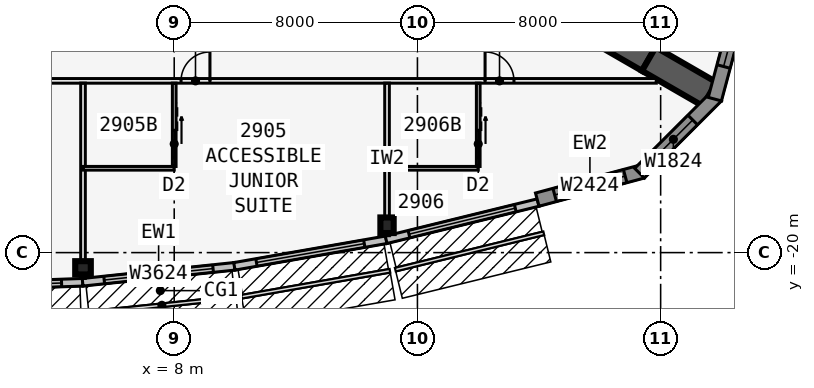
"""IFC4 building model, lengths in metres.
Left out: names, types, materials, properties, quantities, classifications, styles, units other than length and angle.
Written with IfcOpenShell. Run it as: python <this file> out.ifc"""

import sys

from ifc_helpers import new_model, si_unit, direction, frame, frame_2d, origin, origin_2d, place, context, subcontext, project, spatial, polyline, rectangle, i_section, outline, extrude, element, fill, save


model = new_model("IFC4")
c1 = context("Model", 3, precision=1e-05, world=origin(), true_north=direction((0.0, 1.0)))
c2 = subcontext(c1, "Body", "Model", "MODEL_VIEW")
j1 = project(units=[si_unit("LENGTHUNIT", "METRE"), si_unit("PLANEANGLEUNIT", "RADIAN")], contexts=[c1])
p1 = place(None, origin())
s1 = spatial("IfcSite", under=j1, at=p1, CompositionType="ELEMENT")
p2 = place(p1, origin())
s2 = spatial("IfcBuilding", under=s1, at=p2, CompositionType="ELEMENT")
p3 = place(p2, frame((0.0, 0.0, 114.7)))
s3 = spatial("IfcBuildingStorey", under=s2, at=p3, CompositionType="ELEMENT", Elevation=114.7)
for number, where, z_axis, x_axis in (
    (1, (21.61, -12.477, 0.0), (0.0, 0.0, 1.0), (0.866, -0.5, 0.0)),
    (2, (23.61, -13.631, 0.0), (0.0, 0.0, 1.0), (0.866, -0.5, 0.0)),
):
    element("IfcWall", number, at=place(p3, frame(where, z_axis=z_axis, x_axis=x_axis)), inside=s3, PredefinedType="SHEAR", context=c2, shape_type="SweptSolid", body=[
        extrude(rectangle(XDim=2.309, YDim=0.9, at=frame_2d((1.155, 0.0))), origin(), (0.0, 0.0, 1.0), 3.4),
    ])
for number, where, z_axis, x_axis in (
    (3, (5.0, -20.5, 0.0), (0.0, 0.0, 1.0), (0.0, -1.0, 0.0)),
    (4, (15.0, -19.1, 0.0), (0.0, 0.0, 1.0), (1.0, 0.0, 0.0)),
):
    element("IfcColumn", number, at=place(p3, frame(where, z_axis=z_axis, x_axis=x_axis)), inside=s3, PredefinedType="COLUMN", context=c2, shape_type="SweptSolid", body=[
        extrude(i_section(OverallWidth=0.437, OverallDepth=0.513, WebThickness=0.061, FlangeThickness=0.097, at=origin_2d()), origin(), (0.0, 0.0, 1.0), 3.4),
    ])
p4 = place(p3, frame((-0.004, -21.15, 0.0), z_axis=(0.0, 0.0, 1.0), x_axis=(0.999387720943, 0.034988329879, 0.0)))
e5 = element("IfcWall", 5, at=p4, inside=s3, PredefinedType="STANDARD", context=c2, shape_type="SweptSolid", body=[
    extrude(rectangle(XDim=5.003, YDim=0.25, at=frame_2d((2.501, 0.0))), origin(), (0.0, 0.0, 1.0), 3.235),
])
p5 = place(p4, frame((0.701, 0.0, 0.45)))
e6 = element("IfcOpeningElement", 6, at=p5, cuts=e5, PredefinedType="OPENING", context=c2, shape_type="SweptSolid", body=[
    extrude(rectangle(XDim=3.6, YDim=2.4, at=frame_2d((1.8, 1.2))), frame((0.0, 0.135, 0.0), z_axis=(0.0, -1.0, 0.0), x_axis=(1.0, 0.0, 0.0)), (0.0, 0.0, 1.0), 0.27),
])
p6 = place(p3, frame((4.987, -20.976, 0.0), z_axis=(0.0, 0.0, 1.0), x_axis=(0.994534683851, 0.104406717299, 0.0)))
e7 = element("IfcWall", 7, at=p6, inside=s3, PredefinedType="STANDARD", context=c2, shape_type="SweptSolid", body=[
    extrude(rectangle(XDim=5.028, YDim=0.25, at=frame_2d((2.514, 0.0))), origin(), (0.0, 0.0, 1.0), 3.235),
])
p7 = place(p6, frame((0.714, 0.0, 0.45)))
e8 = element("IfcOpeningElement", 8, at=p7, cuts=e7, PredefinedType="OPENING", context=c2, shape_type="SweptSolid", body=[
    extrude(rectangle(XDim=3.6, YDim=2.4, at=frame_2d((1.8, 1.2))), frame((0.0, 0.135, 0.0), z_axis=(0.0, -1.0, 0.0), x_axis=(1.0, 0.0, 0.0)), (0.0, 0.0, 1.0), 0.27),
])
p8 = place(p3, frame((9.979, -20.452, 0.0), z_axis=(0.0, 0.0, 1.0), x_axis=(0.985030467156, 0.172380331752, 0.0)))
e9 = element("IfcWall", 9, at=p8, inside=s3, PredefinedType="STANDARD", context=c2, shape_type="SweptSolid", body=[
    extrude(rectangle(XDim=5.076, YDim=0.25, at=frame_2d((2.538, 0.0))), origin(), (0.0, 0.0, 1.0), 3.235),
])
p9 = place(p8, frame((0.738, 0.0, 0.45)))
e10 = element("IfcOpeningElement", 10, at=p9, cuts=e9, PredefinedType="OPENING", context=c2, shape_type="SweptSolid", body=[
    extrude(rectangle(XDim=3.6, YDim=2.4, at=frame_2d((1.8, 1.2))), frame((0.0, 0.135, 0.0), z_axis=(0.0, -1.0, 0.0), x_axis=(1.0, 0.0, 0.0)), (0.0, 0.0, 1.0), 0.27),
])
p10 = place(p3, frame((14.97, -19.579, 0.0), z_axis=(0.0, 0.0, 1.0), x_axis=(0.971270024053, 0.237980126011, 0.0)))
e11 = element("IfcWall", 11, at=p10, inside=s3, PredefinedType="STANDARD", context=c2, shape_type="SweptSolid", body=[
    extrude(rectangle(XDim=5.148, YDim=0.25, at=frame_2d((2.574, 0.0))), origin(), (0.0, 0.0, 1.0), 3.235),
])
p11 = place(p10, frame((0.774, 0.0, 0.45)))
e12 = element("IfcOpeningElement", 12, at=p11, cuts=e11, PredefinedType="OPENING", context=c2, shape_type="SweptSolid", body=[
    extrude(rectangle(XDim=3.6, YDim=2.4, at=frame_2d((1.8, 1.2))), frame((0.0, 0.135, 0.0), z_axis=(0.0, -1.0, 0.0), x_axis=(1.0, 0.0, 0.0)), (0.0, 0.0, 1.0), 0.27),
])
p12 = place(p3, frame((19.942, -18.258, 0.0), z_axis=(0.0, 0.0, 1.0), x_axis=(0.965924653531, 0.258823421857, 0.0)))
e13 = element("IfcWall", 13, at=p12, inside=s3, PredefinedType="SOLIDWALL", context=c2, shape_type="SweptSolid", body=[
    extrude(rectangle(XDim=3.586, YDim=0.45, at=frame_2d((1.793, 0.0))), origin(), (0.0, 0.0, 1.0), 3.235),
])
p13 = place(p12, frame((0.593, 0.0, 0.45)))
e14 = element("IfcOpeningElement", 14, at=p13, cuts=e13, PredefinedType="OPENING", context=c2, shape_type="SweptSolid", body=[
    extrude(rectangle(XDim=2.4, YDim=2.4, at=frame_2d((1.2, 1.2))), frame((0.0, 0.235, 0.0), z_axis=(0.0, -1.0, 0.0), x_axis=(1.0, 0.0, 0.0)), (0.0, 0.0, 1.0), 0.47),
])
p14 = place(p3, frame((23.305, -17.388, 0.0), z_axis=(0.0, 0.0, 1.0), x_axis=(0.707106781187, 0.707106781187, 0.0)))
e15 = element("IfcWall", 15, at=p14, inside=s3, PredefinedType="SOLIDWALL", context=c2, shape_type="SweptSolid", body=[
    extrude(outline(polyline([(3.586, 0.225), (3.527, 0.225), (3.035, 0.093), (3.0, 0.225), (0.0, 0.225), (0.0, -0.225), (3.586, -0.225), (3.586, 0.225)])), origin(), (0.0, 0.0, 1.0), 3.235),
])
p15 = place(p14, frame((0.675, 0.0, 0.45)))
e16 = element("IfcOpeningElement", 16, at=p15, cuts=e15, PredefinedType="OPENING", context=c2, shape_type="SweptSolid", body=[
    extrude(rectangle(XDim=1.8, YDim=2.4, at=frame_2d((0.9, 1.2))), frame((0.0, 0.235, 0.0), z_axis=(0.0, -1.0, 0.0), x_axis=(1.0, 0.0, 0.0)), (0.0, 0.0, 1.0), 0.47),
])
p16 = place(p3, frame((25.783, -14.953, 0.0), z_axis=(0.0, 0.0, 1.0), x_axis=(0.258823421857, 0.965924653531, 0.0)))
e17 = element("IfcWall", 17, at=p16, inside=s3, PredefinedType="SOLIDWALL", context=c2, shape_type="SweptSolid", body=[
    extrude(outline(polyline([(3.586, 0.225), (0.586, 0.225), (0.551, 0.093), (0.06, 0.225), (0.0, 0.225), (0.0, -0.225), (3.586, -0.225), (3.586, 0.225)])), origin(), (0.0, 0.0, 1.0), 3.235),
])
p17 = place(p16, frame((1.111, 0.0, 0.45)))
e18 = element("IfcOpeningElement", 18, at=p17, cuts=e17, PredefinedType="OPENING", context=c2, shape_type="SweptSolid", body=[
    extrude(rectangle(XDim=1.8, YDim=2.4, at=frame_2d((0.9, 1.2))), frame((0.0, 0.235, 0.0), z_axis=(0.0, -1.0, 0.0), x_axis=(1.0, 0.0, 0.0)), (0.0, 0.0, 1.0), 0.47),
])
p18 = place(p3, frame((-23.857, -14.351, 0.0), z_axis=(0.0, 0.0, 1.0), x_axis=(1.0, 0.0, 0.0)))
e19 = element("IfcWall", 19, at=p18, inside=s3, PredefinedType="PARTITIONING", context=c2, shape_type="SweptSolid", body=[
    extrude(rectangle(XDim=47.714, YDim=0.15, at=frame_2d((23.857, 0.0))), origin(), (0.0, 0.0, 1.0), 3.235),
])
p19 = place(p18, frame((4.682, 0.0, 0.0)))
e20 = element("IfcOpeningElement", 20, at=p19, cuts=e19, PredefinedType="OPENING", context=c2, shape_type="SweptSolid", body=[
    extrude(rectangle(XDim=0.95, YDim=2.13, at=frame_2d((0.475, 1.065))), frame((0.0, 0.085, 0.0), z_axis=(0.0, -1.0, 0.0), x_axis=(1.0, 0.0, 0.0)), (0.0, 0.0, 1.0), 0.17),
])
p20 = place(p18, frame((11.482, 0.0, 0.0)))
e21 = element("IfcOpeningElement", 21, at=p20, cuts=e19, PredefinedType="OPENING", context=c2, shape_type="SweptSolid", body=[
    extrude(rectangle(XDim=0.95, YDim=2.13, at=frame_2d((0.475, 1.065))), frame((0.0, 0.085, 0.0), z_axis=(0.0, -1.0, 0.0), x_axis=(1.0, 0.0, 0.0)), (0.0, 0.0, 1.0), 0.17),
])
p21 = place(p18, frame((16.482, 0.0, 0.0)))
e22 = element("IfcOpeningElement", 22, at=p21, cuts=e19, PredefinedType="OPENING", context=c2, shape_type="SweptSolid", body=[
    extrude(rectangle(XDim=0.95, YDim=2.13, at=frame_2d((0.475, 1.065))), frame((0.0, 0.085, 0.0), z_axis=(0.0, -1.0, 0.0), x_axis=(1.0, 0.0, 0.0)), (0.0, 0.0, 1.0), 0.17),
])
p22 = place(p18, frame((21.482, 0.0, 0.0)))
e23 = element("IfcOpeningElement", 23, at=p22, cuts=e19, PredefinedType="OPENING", context=c2, shape_type="SweptSolid", body=[
    extrude(rectangle(XDim=0.95, YDim=2.13, at=frame_2d((0.475, 1.065))), frame((0.0, 0.085, 0.0), z_axis=(0.0, -1.0, 0.0), x_axis=(1.0, 0.0, 0.0)), (0.0, 0.0, 1.0), 0.17),
])
p23 = place(p18, frame((25.857, 0.0, 0.0)))
e24 = element("IfcOpeningElement", 24, at=p23, cuts=e19, PredefinedType="OPENING", context=c2, shape_type="SweptSolid", body=[
    extrude(rectangle(XDim=1.0, YDim=2.13, at=frame_2d((0.5, 1.065))), frame((0.0, 0.085, 0.0), z_axis=(0.0, -1.0, 0.0), x_axis=(1.0, 0.0, 0.0)), (0.0, 0.0, 1.0), 0.17),
])
p24 = place(p18, frame((32.082, 0.0, 0.0)))
e25 = element("IfcOpeningElement", 25, at=p24, cuts=e19, PredefinedType="OPENING", context=c2, shape_type="SweptSolid", body=[
    extrude(rectangle(XDim=0.95, YDim=2.13, at=frame_2d((0.475, 1.065))), frame((0.0, 0.085, 0.0), z_axis=(0.0, -1.0, 0.0), x_axis=(1.0, 0.0, 0.0)), (0.0, 0.0, 1.0), 0.17),
])
p25 = place(p18, frame((42.082, 0.0, 0.0)))
e26 = element("IfcOpeningElement", 26, at=p25, cuts=e19, PredefinedType="OPENING", context=c2, shape_type="SweptSolid", body=[
    extrude(rectangle(XDim=0.95, YDim=2.13, at=frame_2d((0.475, 1.065))), frame((0.0, 0.085, 0.0), z_axis=(0.0, -1.0, 0.0), x_axis=(1.0, 0.0, 0.0)), (0.0, 0.0, 1.0), 0.17),
])
p26 = place(p3, frame((5.0, -14.426, 0.0), z_axis=(0.0, 0.0, 1.0), x_axis=(0.0, -1.0, 0.0)))
e27 = element("IfcWall", 27, at=p26, inside=s3, PredefinedType="PARTITIONING", context=c2, shape_type="SweptSolid", body=[
    extrude(rectangle(XDim=6.423, YDim=0.15, at=frame_2d((3.211, 0.0))), origin(), (0.0, 0.0, 1.0), 2.389),
])
p27 = place(p3, frame((15.0, -14.426, 0.0), z_axis=(0.0, 0.0, 1.0), x_axis=(0.0, -1.0, 0.0)))
e28 = element("IfcWall", 28, at=p27, inside=s3, PredefinedType="PARTITIONING", context=c2, shape_type="SweptSolid", body=[
    extrude(rectangle(XDim=5.017, YDim=0.15, at=frame_2d((2.508, 0.0))), origin(), (0.0, 0.0, 1.0), 2.389),
])
p28 = place(p3, frame((5.0, -17.226, 0.0), z_axis=(0.0, 0.0, 1.0), x_axis=(1.0, 0.0, 0.0)))
e29 = element("IfcWall", 29, at=p28, inside=s3, PredefinedType="PLUMBINGWALL", context=c2, shape_type="SweptSolid", body=[
    extrude(rectangle(XDim=3.0, YDim=0.12, at=frame_2d((1.5, 0.0))), origin(), (0.0, 0.0, 1.0), 3.235),
])
p29 = place(p3, frame((8.0, -14.426, 0.0), z_axis=(0.0, 0.0, 1.0), x_axis=(0.0, -1.0, 0.0)))
e30 = element("IfcWall", 30, at=p29, inside=s3, PredefinedType="PLUMBINGWALL", context=c2, shape_type="SweptSolid", body=[
    extrude(rectangle(XDim=2.74, YDim=0.12, at=frame_2d((1.37, 0.0))), origin(), (0.0, 0.0, 1.0), 3.235),
])
p30 = place(p29, frame((1.55, 0.0, 0.0)))
e31 = element("IfcOpeningElement", 31, at=p30, cuts=e30, PredefinedType="OPENING", context=c2, shape_type="SweptSolid", body=[
    extrude(rectangle(XDim=0.9, YDim=2.13, at=frame_2d((0.45, 1.065))), frame((0.0, 0.07, 0.0), z_axis=(0.0, -1.0, 0.0), x_axis=(1.0, 0.0, 0.0)), (0.0, 0.0, 1.0), 0.14),
])
p31 = place(p3, frame((15.0, -17.226, 0.0), z_axis=(0.0, 0.0, 1.0), x_axis=(1.0, 0.0, 0.0)))
e32 = element("IfcWall", 32, at=p31, inside=s3, PredefinedType="PLUMBINGWALL", context=c2, shape_type="SweptSolid", body=[
    extrude(rectangle(XDim=3.0, YDim=0.12, at=frame_2d((1.5, 0.0))), origin(), (0.0, 0.0, 1.0), 3.235),
])
p32 = place(p3, frame((18.0, -14.426, 0.0), z_axis=(0.0, 0.0, 1.0), x_axis=(0.0, -1.0, 0.0)))
e33 = element("IfcWall", 33, at=p32, inside=s3, PredefinedType="PLUMBINGWALL", context=c2, shape_type="SweptSolid", body=[
    extrude(rectangle(XDim=2.74, YDim=0.12, at=frame_2d((1.37, 0.0))), origin(), (0.0, 0.0, 1.0), 3.235),
])
p33 = place(p32, frame((1.55, 0.0, 0.0)))
e34 = element("IfcOpeningElement", 34, at=p33, cuts=e33, PredefinedType="OPENING", context=c2, shape_type="SweptSolid", body=[
    extrude(rectangle(XDim=0.9, YDim=2.13, at=frame_2d((0.45, 1.065))), frame((0.0, 0.07, 0.0), z_axis=(0.0, -1.0, 0.0), x_axis=(1.0, 0.0, 0.0)), (0.0, 0.0, 1.0), 0.14),
])
p34 = place(p5, origin())
e35 = element("IfcWindow", 35, at=p34, inside=s3, PartitioningType="SINGLE_PANEL", PredefinedType="WINDOW", context=c2, shape_type="SweptSolid", body=[
    extrude(rectangle(XDim=3.6, YDim=2.4, at=frame_2d((1.8, 1.2))), frame((0.0, 0.03, 0.0), z_axis=(0.0, -1.0, 0.0), x_axis=(1.0, 0.0, 0.0)), (0.0, 0.0, 1.0), 0.06),
])
fill(e6, e35)
p35 = place(p7, origin())
e36 = element("IfcWindow", 36, at=p35, inside=s3, PartitioningType="SINGLE_PANEL", PredefinedType="WINDOW", context=c2, shape_type="SweptSolid", body=[
    extrude(rectangle(XDim=3.6, YDim=2.4, at=frame_2d((1.8, 1.2))), frame((0.0, 0.03, 0.0), z_axis=(0.0, -1.0, 0.0), x_axis=(1.0, 0.0, 0.0)), (0.0, 0.0, 1.0), 0.06),
])
fill(e8, e36)
p36 = place(p9, origin())
e37 = element("IfcWindow", 37, at=p36, inside=s3, PartitioningType="SINGLE_PANEL", PredefinedType="WINDOW", context=c2, shape_type="SweptSolid", body=[
    extrude(rectangle(XDim=3.6, YDim=2.4, at=frame_2d((1.8, 1.2))), frame((0.0, 0.03, 0.0), z_axis=(0.0, -1.0, 0.0), x_axis=(1.0, 0.0, 0.0)), (0.0, 0.0, 1.0), 0.06),
])
fill(e10, e37)
p37 = place(p11, origin())
e38 = element("IfcWindow", 38, at=p37, inside=s3, PartitioningType="SINGLE_PANEL", PredefinedType="WINDOW", context=c2, shape_type="SweptSolid", body=[
    extrude(rectangle(XDim=3.6, YDim=2.4, at=frame_2d((1.8, 1.2))), frame((0.0, 0.03, 0.0), z_axis=(0.0, -1.0, 0.0), x_axis=(1.0, 0.0, 0.0)), (0.0, 0.0, 1.0), 0.06),
])
fill(e12, e38)
p38 = place(p13, origin())
e39 = element("IfcWindow", 39, at=p38, inside=s3, PartitioningType="SINGLE_PANEL", PredefinedType="WINDOW", context=c2, shape_type="SweptSolid", body=[
    extrude(rectangle(XDim=2.4, YDim=2.4, at=frame_2d((1.2, 1.2))), frame((0.0, 0.03, 0.0), z_axis=(0.0, -1.0, 0.0), x_axis=(1.0, 0.0, 0.0)), (0.0, 0.0, 1.0), 0.06),
])
fill(e14, e39)
p39 = place(p15, origin())
e40 = element("IfcWindow", 40, at=p39, inside=s3, PartitioningType="SINGLE_PANEL", PredefinedType="WINDOW", context=c2, shape_type="SweptSolid", body=[
    extrude(rectangle(XDim=1.8, YDim=2.4, at=frame_2d((0.9, 1.2))), frame((0.0, 0.03, 0.0), z_axis=(0.0, -1.0, 0.0), x_axis=(1.0, 0.0, 0.0)), (0.0, 0.0, 1.0), 0.06),
])
fill(e16, e40)
p40 = place(p17, origin())
e41 = element("IfcWindow", 41, at=p40, inside=s3, PartitioningType="SINGLE_PANEL", PredefinedType="WINDOW", context=c2, shape_type="SweptSolid", body=[
    extrude(rectangle(XDim=1.8, YDim=2.4, at=frame_2d((0.9, 1.2))), frame((0.0, 0.03, 0.0), z_axis=(0.0, -1.0, 0.0), x_axis=(1.0, 0.0, 0.0)), (0.0, 0.0, 1.0), 0.06),
])
fill(e18, e41)
p41 = place(p30, origin())
e42 = element("IfcDoor", 42, at=p41, inside=s3, OperationType="SLIDING_TO_LEFT", PredefinedType="DOOR", context=c2, shape_type="SweptSolid", body=[
    extrude(rectangle(XDim=0.9, YDim=2.13, at=frame_2d((0.45, 1.065))), frame((0.0, 0.025, 0.0), z_axis=(0.0, -1.0, 0.0), x_axis=(1.0, 0.0, 0.0)), (0.0, 0.0, 1.0), 0.05),
])
fill(e31, e42)
p42 = place(p24, origin())
e43 = element("IfcDoor", 43, at=p42, inside=s3, OperationType="SINGLE_SWING_RIGHT", PredefinedType="DOOR", context=c2, shape_type="SweptSolid", body=[
    extrude(rectangle(XDim=0.95, YDim=2.13, at=frame_2d((0.475, 1.065))), frame((0.0, 0.025, 0.0), z_axis=(0.0, -1.0, 0.0), x_axis=(1.0, 0.0, 0.0)), (0.0, 0.0, 1.0), 0.05),
])
fill(e25, e43)
p43 = place(p33, origin())
e44 = element("IfcDoor", 44, at=p43, inside=s3, OperationType="SLIDING_TO_LEFT", PredefinedType="DOOR", context=c2, shape_type="SweptSolid", body=[
    extrude(rectangle(XDim=0.9, YDim=2.13, at=frame_2d((0.45, 1.065))), frame((0.0, 0.025, 0.0), z_axis=(0.0, -1.0, 0.0), x_axis=(1.0, 0.0, 0.0)), (0.0, 0.0, 1.0), 0.05),
])
fill(e34, e44)
p44 = place(p25, origin())
e45 = element("IfcDoor", 45, at=p44, inside=s3, OperationType="SINGLE_SWING_LEFT", PredefinedType="DOOR", context=c2, shape_type="SweptSolid", body=[
    extrude(rectangle(XDim=0.95, YDim=2.13, at=frame_2d((0.475, 1.065))), frame((0.0, 0.025, 0.0), z_axis=(0.0, -1.0, 0.0), x_axis=(1.0, 0.0, 0.0)), (0.0, 0.0, 1.0), 0.05),
])
fill(e26, e45)
save(model, sys.argv[1])
